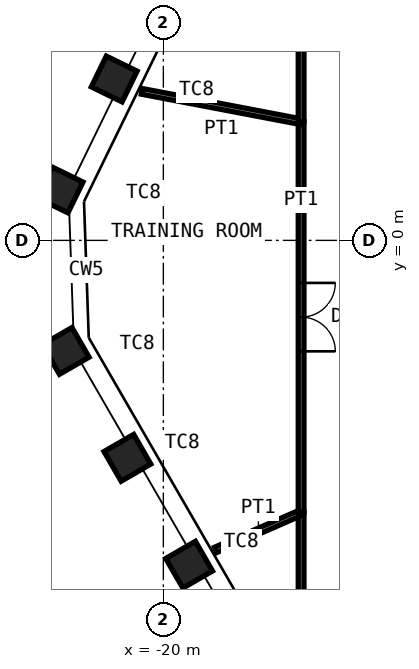
"""IFC4 building model, lengths in metres.
Left out: names, types, materials, properties, quantities, classifications, styles, units other than length and angle.
Written with IfcOpenShell. Run it as: python <this file> out.ifc"""

import sys

from ifc_helpers import new_model, si_unit, direction, frame, frame_2d, origin, origin_2d, place, context, subcontext, project, spatial, rectangle, hollow_rectangle, extrude, element, fill, save


model = new_model("IFC4")
c1 = context("Model", 3, precision=1e-05, world=origin(), true_north=direction((0.0, 1.0)))
c2 = subcontext(c1, "Body", "Model", "MODEL_VIEW")
j1 = project(units=[si_unit("LENGTHUNIT", "METRE"), si_unit("PLANEANGLEUNIT", "RADIAN")], contexts=[c1])
p1 = place(None, origin())
s1 = spatial("IfcSite", under=j1, at=p1, CompositionType="ELEMENT")
p2 = place(p1, origin())
s2 = spatial("IfcBuilding", under=s1, at=p2, CompositionType="ELEMENT")
p3 = place(p2, frame((0.0, 0.0, 304.0)))
s3 = spatial("IfcBuildingStorey", under=s2, at=p3, CompositionType="ELEMENT", Elevation=304.0)
for number, where, z_axis, x_axis in (
    (1, (-19.322, -8.534, 0.0), (0.0, 0.0, 1.0), (0.5, -0.866, 0.0)),
    (2, (-20.946, -5.721, 0.0), (0.0, 0.0, 1.0), (0.5, -0.866, 0.0)),
    (3, (-22.57, -2.908, 0.0), (0.0, 0.0, 1.0), (0.5, -0.866, 0.0)),
    (4, (-22.717, 1.327, 0.0), (0.0, 0.0, 1.0), (-0.438, -0.899, 0.0)),
    (5, (-21.293, 4.246, 0.0), (0.0, 0.0, 1.0), (-0.438, -0.899, 0.0)),
):
    element("IfcColumn", number, at=place(p3, frame(where, z_axis=z_axis, x_axis=x_axis)), inside=s3, PredefinedType="COLUMN", context=c2, shape_type="SweptSolid", body=[
        extrude(hollow_rectangle(XDim=0.9, YDim=0.9, WallThickness=0.05, at=origin_2d()), origin(), (0.0, 0.0, 1.0), 4.2),
    ])
p4 = place(p3, frame((-16.375, -11.275, 0.0), z_axis=(0.0, 0.0, 1.0), x_axis=(0.0, 1.0, 0.0)))
e6 = element("IfcWall", 6, at=p4, inside=s3, PredefinedType="PARTITIONING", context=c2, shape_type="SweptSolid", body=[
    extrude(rectangle(XDim=4.114, YDim=0.15, at=frame_2d((2.057, 0.0))), origin(), (0.0, 0.0, 1.0), 4.03),
])
p5 = place(p3, frame((-18.624, -8.144, 0.0), z_axis=(0.0, 0.0, 1.0), x_axis=(0.916207556777, 0.400704021574, 0.0)))
e7 = element("IfcWall", 7, at=p5, inside=s3, PredefinedType="PARTITIONING", context=c2, shape_type="SweptSolid", body=[
    extrude(rectangle(XDim=2.454, YDim=0.15, at=frame_2d((1.227, 0.0))), origin(), (0.0, 0.0, 1.0), 3.33),
])
p6 = place(p3, frame((-16.375, -7.161, 0.0), z_axis=(0.0, 0.0, 1.0), x_axis=(0.0, 1.0, 0.0)))
e8 = element("IfcWall", 8, at=p6, inside=s3, PredefinedType="PARTITIONING", context=c2, shape_type="SweptSolid", body=[
    extrude(rectangle(XDim=10.283, YDim=0.15, at=frame_2d((5.141, 0.0))), origin(), (0.0, 0.0, 1.0), 4.03),
])
p7 = place(p6, frame((4.241, 0.0, 0.0)))
e9 = element("IfcOpeningElement", 9, at=p7, cuts=e8, PredefinedType="OPENING", context=c2, shape_type="SweptSolid", body=[
    extrude(rectangle(XDim=1.8, YDim=2.4, at=frame_2d((0.9, 1.2))), frame((0.0, 0.085, 0.0), z_axis=(0.0, -1.0, 0.0), x_axis=(1.0, 0.0, 0.0)), (0.0, 0.0, 1.0), 0.17),
])
p8 = place(p3, frame((-20.566, 3.921, 0.0), z_axis=(0.0, 0.0, 1.0), x_axis=(0.982305997167, -0.187283015595, 0.0)))
e10 = element("IfcWall", 10, at=p8, inside=s3, PredefinedType="PARTITIONING", context=c2, shape_type="SweptSolid", body=[
    extrude(rectangle(XDim=4.267, YDim=0.15, at=frame_2d((2.133, 0.0))), origin(), (0.0, 0.0, 1.0), 3.33),
])
p9 = place(p3, frame((-16.375, 3.122, 0.0), z_axis=(0.0, 0.0, 1.0), x_axis=(0.0, 1.0, 0.0)))
e11 = element("IfcWall", 11, at=p9, inside=s3, PredefinedType="PARTITIONING", context=c2, shape_type="SweptSolid", body=[
    extrude(rectangle(XDim=5.865, YDim=0.15, at=frame_2d((2.933, 0.0))), origin(), (0.0, 0.0, 1.0), 4.03),
])
p10 = place(p9, frame((2.433, 0.0, 0.0)))
e12 = element("IfcOpeningElement", 12, at=p10, cuts=e11, PredefinedType="OPENING", context=c2, shape_type="SweptSolid", body=[
    extrude(rectangle(XDim=1.0, YDim=2.4, at=frame_2d((0.5, 1.2))), frame((0.0, 0.085, 0.0), z_axis=(0.0, -1.0, 0.0), x_axis=(1.0, 0.0, 0.0)), (0.0, 0.0, 1.0), 0.17),
])
p11 = place(p7, origin())
e13 = element("IfcDoor", 13, at=p11, inside=s3, OperationType="DOUBLE_DOOR_DOUBLE_SWING", PredefinedType="DOOR", context=c2, shape_type="SweptSolid", body=[
    extrude(rectangle(XDim=1.8, YDim=2.4, at=frame_2d((0.9, 1.2))), frame((0.0, 0.025, 0.0), z_axis=(0.0, -1.0, 0.0), x_axis=(1.0, 0.0, 0.0)), (0.0, 0.0, 1.0), 0.05),
])
fill(e9, e13)
save(model, sys.argv[1])
